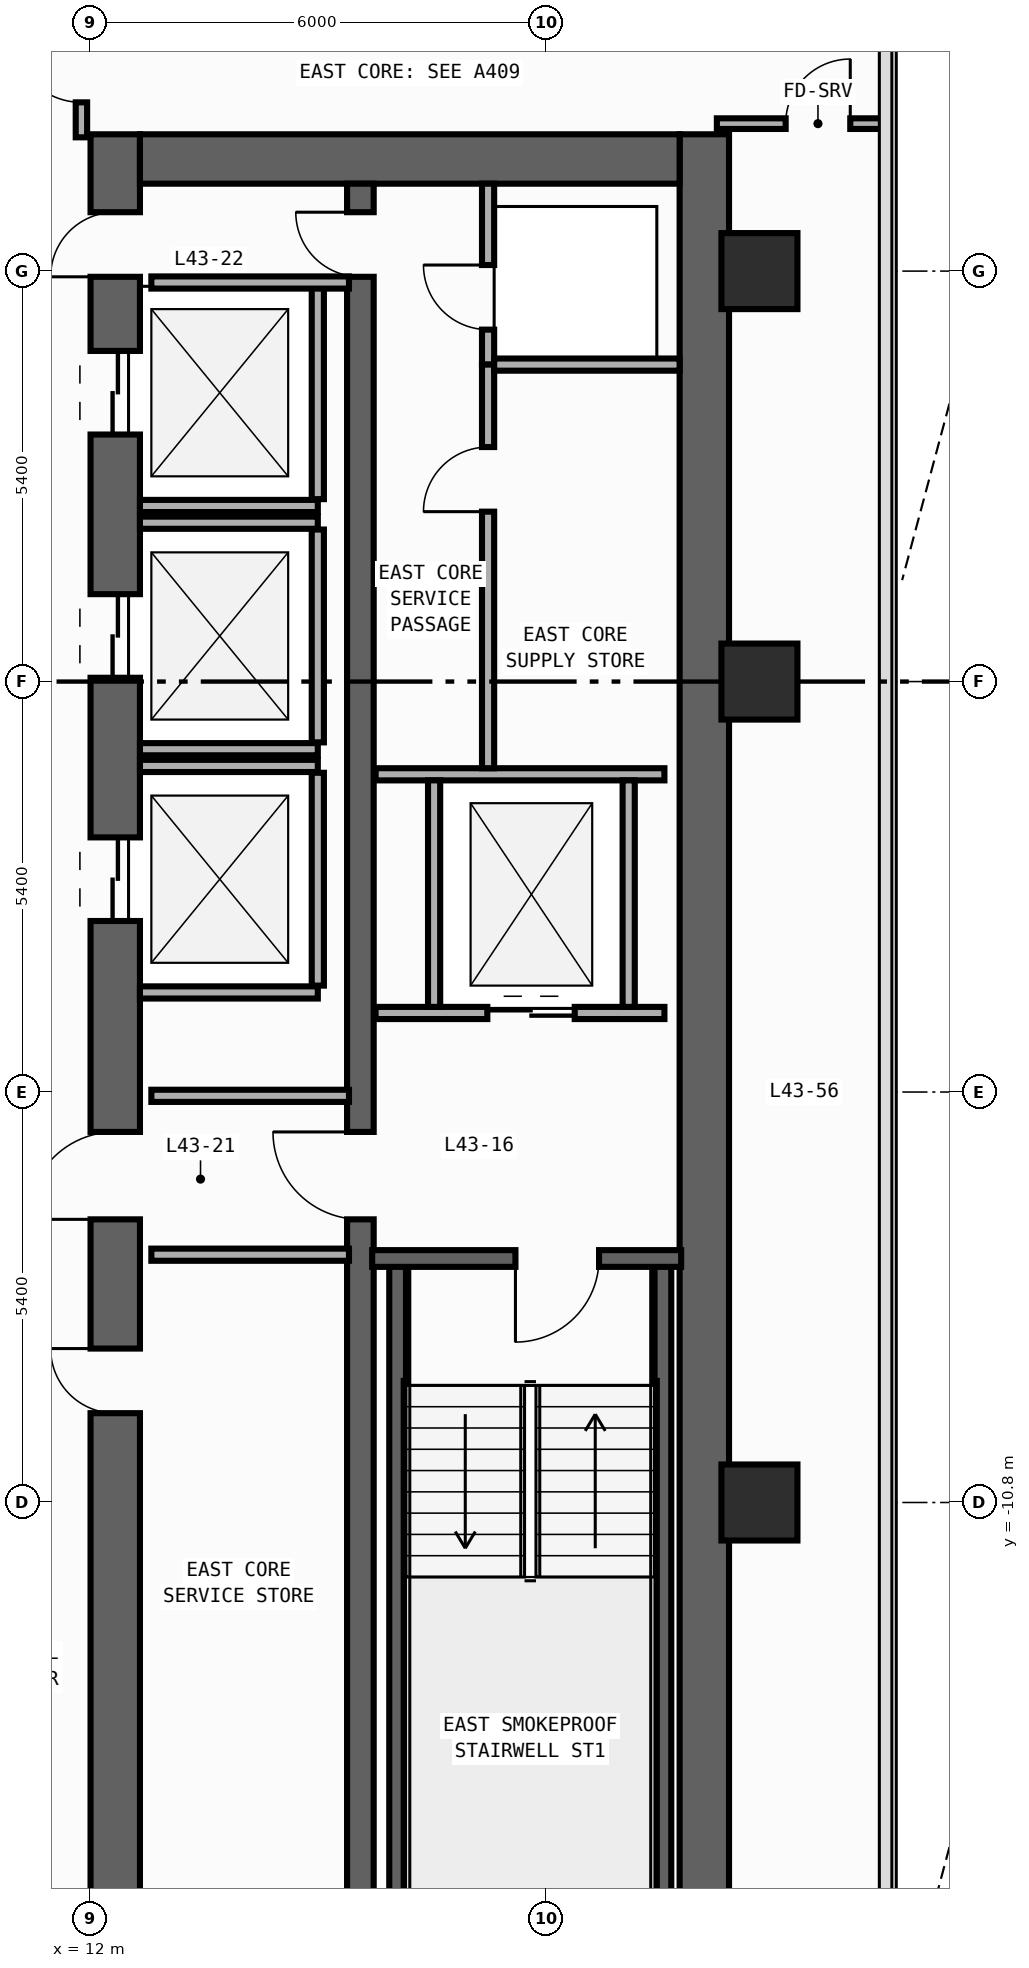
"""IFC4 building model, lengths in metres.
Left out: names, types, materials, properties, quantities, classifications, styles, units other than length and angle.
Written with IfcOpenShell. Run it as: python <this file> out.ifc"""

import sys

from ifc_helpers import new_model, si_unit, direction, frame, frame_2d, origin, origin_2d, place, context, subcontext, project, spatial, rectangle, extrude, element, fill, save


model = new_model("IFC4")
c1 = context("Model", 3, precision=1e-05, world=origin(), true_north=direction((0.0, 1.0)))
c2 = subcontext(c1, "Body", "Model", "MODEL_VIEW")
j1 = project(units=[si_unit("LENGTHUNIT", "METRE"), si_unit("PLANEANGLEUNIT", "RADIAN")], contexts=[c1])
p1 = place(None, origin())
s1 = spatial("IfcSite", under=j1, at=p1, CompositionType="ELEMENT")
p2 = place(p1, origin())
s2 = spatial("IfcBuilding", under=s1, at=p2, CompositionType="ELEMENT")
p3 = place(p2, frame((0.0, 0.0, 187.8)))
s3 = spatial("IfcBuildingStorey", under=s2, at=p3, CompositionType="ELEMENT", Elevation=187.8)
p4 = place(p3, frame((12.325, -19.8, 0.0), z_axis=(0.0, 0.0, 1.0), x_axis=(0.0, 1.0, 0.0)))
e1 = element("IfcWall", 1, at=p4, inside=s3, PredefinedType="SHEAR", context=c2, shape_type="SweptSolid", body=[
    extrude(rectangle(XDim=27.0, YDim=0.65, at=frame_2d((13.5, 0.0))), origin(), (0.0, 0.0, 1.0), 3.54),
])
p5 = place(p4, frame((23.05, 0.0, 0.0)))
e2 = element("IfcOpeningElement", 2, at=p5, cuts=e1, PredefinedType="OPENING", context=c2, shape_type="SweptSolid", body=[
    extrude(rectangle(XDim=1.1, YDim=2.2, at=frame_2d((0.55, 1.1))), frame((0.0, 0.335, 0.0), z_axis=(0.0, -1.0, 0.0), x_axis=(1.0, 0.0, 0.0)), (0.0, 0.0, 1.0), 0.67),
])
p6 = place(p4, frame((19.85, 0.0, 0.0)))
e3 = element("IfcOpeningElement", 3, at=p6, cuts=e1, PredefinedType="OPENING", context=c2, shape_type="SweptSolid", body=[
    extrude(rectangle(XDim=1.1, YDim=2.2, at=frame_2d((0.55, 1.1))), frame((0.0, 0.335, 0.0), z_axis=(0.0, -1.0, 0.0), x_axis=(1.0, 0.0, 0.0)), (0.0, 0.0, 1.0), 0.67),
])
p7 = place(p4, frame((16.65, 0.0, 0.0)))
e4 = element("IfcOpeningElement", 4, at=p7, cuts=e1, PredefinedType="OPENING", context=c2, shape_type="SweptSolid", body=[
    extrude(rectangle(XDim=1.1, YDim=2.2, at=frame_2d((0.55, 1.1))), frame((0.0, 0.335, 0.0), z_axis=(0.0, -1.0, 0.0), x_axis=(1.0, 0.0, 0.0)), (0.0, 0.0, 1.0), 0.67),
])
p8 = place(p4, frame((10.175, 0.0, 0.0)))
e5 = element("IfcOpeningElement", 5, at=p8, cuts=e1, PredefinedType="OPENING", context=c2, shape_type="SweptSolid", body=[
    extrude(rectangle(XDim=0.85, YDim=2.1, at=frame_2d((0.425, 1.05))), frame((0.0, 0.335, 0.0), z_axis=(0.0, -1.0, 0.0), x_axis=(1.0, 0.0, 0.0)), (0.0, 0.0, 1.0), 0.67),
])
p9 = place(p4, frame((12.725, 0.0, 0.0)))
e6 = element("IfcOpeningElement", 6, at=p9, cuts=e1, PredefinedType="OPENING", context=c2, shape_type="SweptSolid", body=[
    extrude(rectangle(XDim=1.15, YDim=2.2, at=frame_2d((0.575, 1.1))), frame((0.0, 0.335, 0.0), z_axis=(0.0, -1.0, 0.0), x_axis=(1.0, 0.0, 0.0)), (0.0, 0.0, 1.0), 0.67),
])
p10 = place(p4, frame((25.125, 0.0, 0.0)))
e7 = element("IfcOpeningElement", 7, at=p10, cuts=e1, PredefinedType="OPENING", context=c2, shape_type="SweptSolid", body=[
    extrude(rectangle(XDim=0.85, YDim=2.1, at=frame_2d((0.425, 1.05))), frame((0.0, 0.335, 0.0), z_axis=(0.0, -1.0, 0.0), x_axis=(1.0, 0.0, 0.0)), (0.0, 0.0, 1.0), 0.67),
])
p11 = place(p3, frame((20.075, -19.8, 0.0), z_axis=(0.0, 0.0, 1.0), x_axis=(0.0, 1.0, 0.0)))
e8 = element("IfcWall", 8, at=p11, inside=s3, PredefinedType="SHEAR", context=c2, shape_type="SweptSolid", body=[
    extrude(rectangle(XDim=27.0, YDim=0.65, at=frame_2d((13.5, 0.0))), origin(), (0.0, 0.0, 1.0), 3.54),
])
p12 = place(p3, frame((12.65, 6.875, 0.0), z_axis=(0.0, 0.0, 1.0), x_axis=(1.0, 0.0, 0.0)))
e9 = element("IfcWall", 9, at=p12, inside=s3, PredefinedType="SHEAR", context=c2, shape_type="SweptSolid", body=[
    extrude(rectangle(XDim=7.1, YDim=0.65, at=frame_2d((3.55, 0.0))), origin(), (0.0, 0.0, 1.0), 3.54),
])
p13 = place(p3, frame((15.55, -19.15, 0.0), z_axis=(0.0, 0.0, 1.0), x_axis=(0.0, 1.0, 0.0)))
e10 = element("IfcWall", 10, at=p13, inside=s3, PredefinedType="SHEAR", context=c2, shape_type="SweptSolid", body=[
    extrude(rectangle(XDim=25.7, YDim=0.35, at=frame_2d((12.85, 0.0))), origin(), (0.0, 0.0, 1.0), 3.54),
])
p14 = place(p13, frame((12.075, 0.0, 0.0)))
e11 = element("IfcOpeningElement", 11, at=p14, cuts=e10, PredefinedType="OPENING", context=c2, shape_type="SweptSolid", body=[
    extrude(rectangle(XDim=1.15, YDim=2.2, at=frame_2d((0.575, 1.1))), frame((0.0, 0.185, 0.0), z_axis=(0.0, -1.0, 0.0), x_axis=(1.0, 0.0, 0.0)), (0.0, 0.0, 1.0), 0.37),
])
p15 = place(p13, frame((24.475, 0.0, 0.0)))
e12 = element("IfcOpeningElement", 12, at=p15, cuts=e10, PredefinedType="OPENING", context=c2, shape_type="SweptSolid", body=[
    extrude(rectangle(XDim=0.85, YDim=2.1, at=frame_2d((0.425, 1.05))), frame((0.0, 0.185, 0.0), z_axis=(0.0, -1.0, 0.0), x_axis=(1.0, 0.0, 0.0)), (0.0, 0.0, 1.0), 0.37),
])
for number, where, z_axis, x_axis in (
    (13, (16.04, -19.01, 0.0), (0.0, 0.0, 1.0), (0.0, 1.0, 0.0)),
    (14, (19.53, -19.01, 0.0), (0.0, 0.0, 1.0), (0.0, 1.0, 0.0)),
):
    element("IfcWall", number, at=place(p3, frame(where, z_axis=z_axis, x_axis=x_axis)), inside=s3, PredefinedType="SHEAR", context=c2, shape_type="SweptSolid", body=[
        extrude(rectangle(XDim=11.42, YDim=0.22, at=frame_2d((5.71, 0.0))), origin(), (0.0, 0.0, 1.0), 3.54),
    ])
p16 = place(p3, frame((19.77, -7.59, 0.0), z_axis=(0.0, 0.0, 1.0), x_axis=(-1.0, 0.0, 0.0)))
e15 = element("IfcWall", 15, at=p16, inside=s3, PredefinedType="SHEAR", context=c2, shape_type="SweptSolid", body=[
    extrude(rectangle(XDim=4.065, YDim=0.22, at=frame_2d((2.032, 0.0))), origin(), (0.0, 0.0, 1.0), 3.54),
])
p17 = place(p16, frame((1.08, 0.0, 0.0)))
e16 = element("IfcOpeningElement", 16, at=p17, cuts=e15, PredefinedType="OPENING", context=c2, shape_type="SweptSolid", body=[
    extrude(rectangle(XDim=1.1, YDim=2.2, at=frame_2d((0.55, 1.1))), frame((0.0, 0.12, 0.0), z_axis=(0.0, -1.0, 0.0), x_axis=(1.0, 0.0, 0.0)), (0.0, 0.0, 1.0), 0.24),
])
for number, where, z_axis, x_axis in (
    (17, (20.8, -10.8, 0.0), (0.0, 0.0, 1.0), (1.0, 0.0, 0.0)),
    (18, (20.8, 0.0, 0.0), (0.0, 0.0, 1.0), (1.0, 0.0, 0.0)),
    (19, (20.8, 5.4, 0.0), (0.0, 0.0, 1.0), (1.0, 0.0, 0.0)),
):
    element("IfcColumn", number, at=place(p3, frame(where, z_axis=z_axis, x_axis=x_axis)), inside=s3, PredefinedType="COLUMN", context=c2, shape_type="SweptSolid", body=[
        extrude(rectangle(XDim=1.0, YDim=1.0, at=origin_2d()), origin(), (0.0, 0.0, 1.0), 3.8),
    ])
p18 = place(p3, frame((12.65, 2.31, 0.0), z_axis=(0.0, 0.0, 1.0), x_axis=(1.0, 0.0, 0.0)))
e20 = element("IfcWall", 20, at=p18, inside=s3, PredefinedType="STANDARD", context=c2, shape_type="SweptSolid", body=[
    extrude(rectangle(XDim=2.34, YDim=0.16, at=frame_2d((1.17, 0.0))), origin(), (0.0, 0.0, 1.0), 3.54),
])
p19 = place(p3, frame((14.99, 2.4, 0.0), z_axis=(0.0, 0.0, 1.0), x_axis=(0.0, 1.0, 0.0)))
e21 = element("IfcWall", 21, at=p19, inside=s3, PredefinedType="STANDARD", context=c2, shape_type="SweptSolid", body=[
    extrude(rectangle(XDim=2.8, YDim=0.16, at=frame_2d((1.4, 0.0))), origin(), (0.0, 0.0, 1.0), 3.54),
])
for number, where, z_axis, x_axis in (
    (22, (12.65, -0.89, 0.0), (0.0, 0.0, 1.0), (1.0, 0.0, 0.0)),
    (23, (12.65, 2.09, 0.0), (0.0, 0.0, 1.0), (1.0, 0.0, 0.0)),
):
    element("IfcWall", number, at=place(p3, frame(where, z_axis=z_axis, x_axis=x_axis)), inside=s3, PredefinedType="STANDARD", context=c2, shape_type="SweptSolid", body=[
        extrude(rectangle(XDim=2.34, YDim=0.16, at=frame_2d((1.17, 0.0))), origin(), (0.0, 0.0, 1.0), 3.54),
    ])
p20 = place(p3, frame((14.99, -0.8, 0.0), z_axis=(0.0, 0.0, 1.0), x_axis=(0.0, 1.0, 0.0)))
e24 = element("IfcWall", 24, at=p20, inside=s3, PredefinedType="STANDARD", context=c2, shape_type="SweptSolid", body=[
    extrude(rectangle(XDim=2.8, YDim=0.16, at=frame_2d((1.4, 0.0))), origin(), (0.0, 0.0, 1.0), 3.54),
])
for number, where, z_axis, x_axis in (
    (25, (12.65, -4.09, 0.0), (0.0, 0.0, 1.0), (1.0, 0.0, 0.0)),
    (26, (12.65, -1.11, 0.0), (0.0, 0.0, 1.0), (1.0, 0.0, 0.0)),
):
    element("IfcWall", number, at=place(p3, frame(where, z_axis=z_axis, x_axis=x_axis)), inside=s3, PredefinedType="STANDARD", context=c2, shape_type="SweptSolid", body=[
        extrude(rectangle(XDim=2.34, YDim=0.16, at=frame_2d((1.17, 0.0))), origin(), (0.0, 0.0, 1.0), 3.54),
    ])
p21 = place(p3, frame((14.99, -4.0, 0.0), z_axis=(0.0, 0.0, 1.0), x_axis=(0.0, 1.0, 0.0)))
e27 = element("IfcWall", 27, at=p21, inside=s3, PredefinedType="STANDARD", context=c2, shape_type="SweptSolid", body=[
    extrude(rectangle(XDim=2.8, YDim=0.16, at=frame_2d((1.4, 0.0))), origin(), (0.0, 0.0, 1.0), 3.54),
])
p22 = place(p3, frame((15.75, -4.36, 0.0), z_axis=(0.0, 0.0, 1.0), x_axis=(1.0, 0.0, 0.0)))
e28 = element("IfcWall", 28, at=p22, inside=s3, PredefinedType="STANDARD", context=c2, shape_type="SweptSolid", body=[
    extrude(rectangle(XDim=3.8, YDim=0.16, at=frame_2d((1.9, 0.0))), origin(), (0.0, 0.0, 1.0), 3.54),
])
p23 = place(p22, frame((1.47, 0.0, 0.0)))
e29 = element("IfcOpeningElement", 29, at=p23, cuts=e28, PredefinedType="OPENING", context=c2, shape_type="SweptSolid", body=[
    extrude(rectangle(XDim=1.15, YDim=2.2, at=frame_2d((0.575, 1.1))), frame((0.0, 0.09, 0.0), z_axis=(0.0, -1.0, 0.0), x_axis=(1.0, 0.0, 0.0)), (0.0, 0.0, 1.0), 0.18),
])
p24 = place(p3, frame((15.75, -1.22, 0.0), z_axis=(0.0, 0.0, 1.0), x_axis=(1.0, 0.0, 0.0)))
e30 = element("IfcWall", 30, at=p24, inside=s3, PredefinedType="STANDARD", context=c2, shape_type="SweptSolid", body=[
    extrude(rectangle(XDim=3.8, YDim=0.16, at=frame_2d((1.9, 0.0))), origin(), (0.0, 0.0, 1.0), 3.54),
])
for number, where, z_axis, x_axis in (
    (31, (16.52, -4.28, 0.0), (0.0, 0.0, 1.0), (0.0, 1.0, 0.0)),
    (32, (19.08, -4.28, 0.0), (0.0, 0.0, 1.0), (0.0, 1.0, 0.0)),
):
    element("IfcWall", number, at=place(p3, frame(where, z_axis=z_axis, x_axis=x_axis)), inside=s3, PredefinedType="STANDARD", context=c2, shape_type="SweptSolid", body=[
        extrude(rectangle(XDim=2.98, YDim=0.16, at=frame_2d((1.49, 0.0))), origin(), (0.0, 0.0, 1.0), 3.54),
    ])
for number, where, z_axis, x_axis in (
    (33, (12.8, -5.45, 0.0), (0.0, 0.0, 1.0), (1.0, 0.0, 0.0)),
    (34, (12.8, -7.54, 0.0), (0.0, 0.0, 1.0), (1.0, 0.0, 0.0)),
    (35, (12.8, 5.25, 0.0), (0.0, 0.0, 1.0), (1.0, 0.0, 0.0)),
):
    element("IfcWall", number, at=place(p3, frame(where, z_axis=z_axis, x_axis=x_axis)), inside=s3, PredefinedType="STANDARD", context=c2, shape_type="SweptSolid", body=[
        extrude(rectangle(XDim=2.6, YDim=0.16, at=frame_2d((1.3, 0.0))), origin(), (0.0, 0.0, 1.0), 3.54),
    ])
p25 = place(p3, frame((17.23, 4.17, 0.0), z_axis=(0.0, 0.0, 1.0), x_axis=(0.0, 1.0, 0.0)))
e36 = element("IfcWall", 36, at=p25, inside=s3, PredefinedType="PARTITIONING", context=c2, shape_type="SweptSolid", body=[
    extrude(rectangle(XDim=2.38, YDim=0.16, at=frame_2d((1.19, 0.0))), origin(), (0.0, 0.0, 1.0), 3.54),
])
p26 = place(p25, frame((0.46, 0.0, 0.0)))
e37 = element("IfcOpeningElement", 37, at=p26, cuts=e36, PredefinedType="OPENING", context=c2, shape_type="SweptSolid", body=[
    extrude(rectangle(XDim=0.85, YDim=2.1, at=frame_2d((0.425, 1.05))), frame((0.0, 0.09, 0.0), z_axis=(0.0, -1.0, 0.0), x_axis=(1.0, 0.0, 0.0)), (0.0, 0.0, 1.0), 0.18),
])
p27 = place(p3, frame((17.23, -1.14, 0.0), z_axis=(0.0, 0.0, 1.0), x_axis=(0.0, 1.0, 0.0)))
e38 = element("IfcWall", 38, at=p27, inside=s3, PredefinedType="PARTITIONING", context=c2, shape_type="SweptSolid", body=[
    extrude(rectangle(XDim=5.31, YDim=0.16, at=frame_2d((2.655, 0.0))), origin(), (0.0, 0.0, 1.0), 3.54),
])
p28 = place(p27, frame((3.375, 0.0, 0.0)))
e39 = element("IfcOpeningElement", 39, at=p28, cuts=e38, PredefinedType="OPENING", context=c2, shape_type="SweptSolid", body=[
    extrude(rectangle(XDim=0.85, YDim=2.1, at=frame_2d((0.425, 1.05))), frame((0.0, 0.09, 0.0), z_axis=(0.0, -1.0, 0.0), x_axis=(1.0, 0.0, 0.0)), (0.0, 0.0, 1.0), 0.18),
])
p29 = place(p3, frame((17.31, 4.17, 0.0), z_axis=(0.0, 0.0, 1.0), x_axis=(1.0, 0.0, 0.0)))
e40 = element("IfcWall", 40, at=p29, inside=s3, PredefinedType="PARTITIONING", context=c2, shape_type="SweptSolid", body=[
    extrude(rectangle(XDim=2.44, YDim=0.16, at=frame_2d((1.22, 0.0))), origin(), (0.0, 0.0, 1.0), 3.54),
])
p30 = place(p3, frame((11.88, 7.16, 0.0), z_axis=(0.0, 0.0, 1.0), x_axis=(0.0, 1.0, 0.0)))
e41 = element("IfcWall", 41, at=p30, inside=s3, PredefinedType="PARTITIONING", context=c2, shape_type="SweptSolid", body=[
    extrude(rectangle(XDim=9.055, YDim=0.15, at=frame_2d((4.528, 0.0))), origin(), (0.0, 0.0, 1.0), 3.54),
])
p31 = place(p30, frame((0.46, 0.0, 0.0)))
e42 = element("IfcOpeningElement", 42, at=p31, cuts=e41, PredefinedType="OPENING", context=c2, shape_type="SweptSolid", body=[
    extrude(rectangle(XDim=0.9, YDim=2.15, at=frame_2d((0.45, 1.075))), frame((0.0, 0.085, 0.0), z_axis=(0.0, -1.0, 0.0), x_axis=(1.0, 0.0, 0.0)), (0.0, 0.0, 1.0), 0.17),
])
p32 = place(p3, frame((20.24, 7.34, 0.0), z_axis=(0.0, 0.0, 1.0), x_axis=(1.0, 0.0, 0.0)))
e43 = element("IfcWall", 43, at=p32, inside=s3, PredefinedType="PARTITIONING", context=c2, shape_type="SweptSolid", body=[
    extrude(rectangle(XDim=2.215, YDim=0.14, at=frame_2d((1.107, 0.0))), origin(), (0.0, 0.0, 1.0), 3.54),
])
p33 = place(p32, frame((0.905, 0.0, 0.0)))
e44 = element("IfcOpeningElement", 44, at=p33, cuts=e43, PredefinedType="OPENING", context=c2, shape_type="SweptSolid", body=[
    extrude(rectangle(XDim=0.85, YDim=2.1, at=frame_2d((0.425, 1.05))), frame((0.0, 0.08, 0.0), z_axis=(0.0, -1.0, 0.0), x_axis=(1.0, 0.0, 0.0)), (0.0, 0.0, 1.0), 0.16),
])
p34 = place(p17, origin())
e45 = element("IfcDoor", 45, at=p34, inside=s3, OperationType="SINGLE_SWING_RIGHT", PredefinedType="DOOR", context=c2, shape_type="SweptSolid", body=[
    extrude(rectangle(XDim=1.1, YDim=2.2, at=frame_2d((0.55, 1.1))), frame((0.0, 0.025, 0.0), z_axis=(0.0, -1.0, 0.0), x_axis=(1.0, 0.0, 0.0)), (0.0, 0.0, 1.0), 0.05),
])
fill(e16, e45)
p35 = place(p5, origin())
e46 = element("IfcDoor", 46, at=p35, inside=s3, OperationType="DOUBLE_DOOR_SLIDING", PredefinedType="DOOR", context=c2, shape_type="SweptSolid", body=[
    extrude(rectangle(XDim=1.1, YDim=2.2, at=frame_2d((0.55, 1.1))), frame((0.0, 0.025, 0.0), z_axis=(0.0, -1.0, 0.0), x_axis=(1.0, 0.0, 0.0)), (0.0, 0.0, 1.0), 0.05),
])
fill(e2, e46)
p36 = place(p6, origin())
e47 = element("IfcDoor", 47, at=p36, inside=s3, OperationType="DOUBLE_DOOR_SLIDING", PredefinedType="DOOR", context=c2, shape_type="SweptSolid", body=[
    extrude(rectangle(XDim=1.1, YDim=2.2, at=frame_2d((0.55, 1.1))), frame((0.0, 0.025, 0.0), z_axis=(0.0, -1.0, 0.0), x_axis=(1.0, 0.0, 0.0)), (0.0, 0.0, 1.0), 0.05),
])
fill(e3, e47)
p37 = place(p7, origin())
e48 = element("IfcDoor", 48, at=p37, inside=s3, OperationType="DOUBLE_DOOR_SLIDING", PredefinedType="DOOR", context=c2, shape_type="SweptSolid", body=[
    extrude(rectangle(XDim=1.1, YDim=2.2, at=frame_2d((0.55, 1.1))), frame((0.0, 0.025, 0.0), z_axis=(0.0, -1.0, 0.0), x_axis=(1.0, 0.0, 0.0)), (0.0, 0.0, 1.0), 0.05),
])
fill(e4, e48)
p38 = place(p8, origin())
e49 = element("IfcDoor", 49, at=p38, inside=s3, OperationType="SINGLE_SWING_RIGHT", PredefinedType="DOOR", context=c2, shape_type="SweptSolid", body=[
    extrude(rectangle(XDim=0.85, YDim=2.1, at=frame_2d((0.425, 1.05))), frame((0.0, 0.025, 0.0), z_axis=(0.0, -1.0, 0.0), x_axis=(1.0, 0.0, 0.0)), (0.0, 0.0, 1.0), 0.05),
])
fill(e5, e49)
p39 = place(p9, origin())
e50 = element("IfcDoor", 50, at=p39, inside=s3, OperationType="SINGLE_SWING_LEFT", PredefinedType="DOOR", context=c2, shape_type="SweptSolid", body=[
    extrude(rectangle(XDim=1.15, YDim=2.2, at=frame_2d((0.575, 1.1))), frame((0.0, 0.025, 0.0), z_axis=(0.0, -1.0, 0.0), x_axis=(1.0, 0.0, 0.0)), (0.0, 0.0, 1.0), 0.05),
])
fill(e6, e50)
p40 = place(p14, origin())
e51 = element("IfcDoor", 51, at=p40, inside=s3, OperationType="SINGLE_SWING_RIGHT", PredefinedType="DOOR", context=c2, shape_type="SweptSolid", body=[
    extrude(rectangle(XDim=1.15, YDim=2.2, at=frame_2d((0.575, 1.1))), frame((0.0, 0.025, 0.0), z_axis=(0.0, -1.0, 0.0), x_axis=(1.0, 0.0, 0.0)), (0.0, 0.0, 1.0), 0.05),
])
fill(e11, e51)
p41 = place(p10, origin())
e52 = element("IfcDoor", 52, at=p41, inside=s3, OperationType="SINGLE_SWING_LEFT", PredefinedType="DOOR", context=c2, shape_type="SweptSolid", body=[
    extrude(rectangle(XDim=0.85, YDim=2.1, at=frame_2d((0.425, 1.05))), frame((0.0, 0.025, 0.0), z_axis=(0.0, -1.0, 0.0), x_axis=(1.0, 0.0, 0.0)), (0.0, 0.0, 1.0), 0.05),
])
fill(e7, e52)
p42 = place(p15, origin())
e53 = element("IfcDoor", 53, at=p42, inside=s3, OperationType="SINGLE_SWING_RIGHT", PredefinedType="DOOR", context=c2, shape_type="SweptSolid", body=[
    extrude(rectangle(XDim=0.85, YDim=2.1, at=frame_2d((0.425, 1.05))), frame((0.0, 0.025, 0.0), z_axis=(0.0, -1.0, 0.0), x_axis=(1.0, 0.0, 0.0)), (0.0, 0.0, 1.0), 0.05),
])
fill(e12, e53)
p43 = place(p23, origin())
e54 = element("IfcDoor", 54, at=p43, inside=s3, OperationType="DOUBLE_DOOR_SLIDING", PredefinedType="DOOR", context=c2, shape_type="SweptSolid", body=[
    extrude(rectangle(XDim=1.15, YDim=2.2, at=frame_2d((0.575, 1.1))), frame((0.0, 0.025, 0.0), z_axis=(0.0, -1.0, 0.0), x_axis=(1.0, 0.0, 0.0)), (0.0, 0.0, 1.0), 0.05),
])
fill(e29, e54)
p44 = place(p26, origin())
e55 = element("IfcDoor", 55, at=p44, inside=s3, OperationType="SINGLE_SWING_RIGHT", PredefinedType="DOOR", context=c2, shape_type="SweptSolid", body=[
    extrude(rectangle(XDim=0.85, YDim=2.1, at=frame_2d((0.425, 1.05))), frame((0.0, 0.025, 0.0), z_axis=(0.0, -1.0, 0.0), x_axis=(1.0, 0.0, 0.0)), (0.0, 0.0, 1.0), 0.05),
])
fill(e37, e55)
p45 = place(p28, origin())
e56 = element("IfcDoor", 56, at=p45, inside=s3, OperationType="SINGLE_SWING_LEFT", PredefinedType="DOOR", context=c2, shape_type="SweptSolid", body=[
    extrude(rectangle(XDim=0.85, YDim=2.1, at=frame_2d((0.425, 1.05))), frame((0.0, 0.025, 0.0), z_axis=(0.0, -1.0, 0.0), x_axis=(1.0, 0.0, 0.0)), (0.0, 0.0, 1.0), 0.05),
])
fill(e39, e56)
p46 = place(p31, origin())
e57 = element("IfcDoor", 57, at=p46, inside=s3, OperationType="SINGLE_SWING_RIGHT", PredefinedType="DOOR", context=c2, shape_type="SweptSolid", body=[
    extrude(rectangle(XDim=0.9, YDim=2.15, at=frame_2d((0.45, 1.075))), frame((0.0, 0.025, 0.0), z_axis=(0.0, -1.0, 0.0), x_axis=(1.0, 0.0, 0.0)), (0.0, 0.0, 1.0), 0.05),
])
fill(e42, e57)
p47 = place(p33, origin())
e58 = element("IfcDoor", 58, at=p47, inside=s3, OperationType="SINGLE_SWING_RIGHT", PredefinedType="DOOR", context=c2, shape_type="SweptSolid", body=[
    extrude(rectangle(XDim=0.85, YDim=2.1, at=frame_2d((0.425, 1.05))), frame((0.0, 0.025, 0.0), z_axis=(0.0, -1.0, 0.0), x_axis=(1.0, 0.0, 0.0)), (0.0, 0.0, 1.0), 0.05),
])
fill(e44, e58)
save(model, sys.argv[1])
